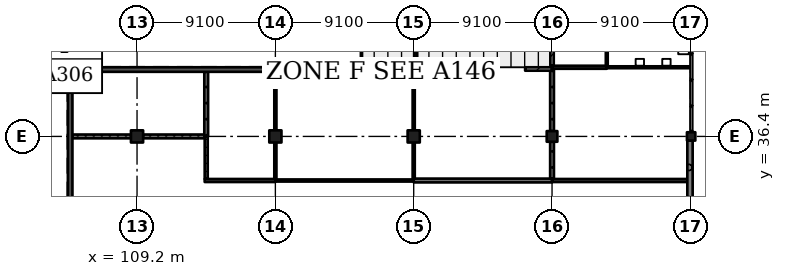
"""IFC4 building model, lengths in metres.
Left out: names, types, materials, properties, quantities, classifications, styles, units other than length and angle.
Written with IfcOpenShell. Run it as: python <this file> out.ifc"""

import sys

from ifc_helpers import new_model, si_unit, direction, frame, frame_2d, origin, origin_2d, place, context, subcontext, project, spatial, rectangle, extrude, element, fill, save


model = new_model("IFC4")
c1 = context("Model", 3, precision=1e-05, world=origin(), true_north=direction((0.0, 1.0)))
c2 = subcontext(c1, "Body", "Model", "MODEL_VIEW")
j1 = project(units=[si_unit("LENGTHUNIT", "METRE"), si_unit("PLANEANGLEUNIT", "RADIAN")], contexts=[c1])
p1 = place(None, origin())
s1 = spatial("IfcSite", under=j1, at=p1, CompositionType="ELEMENT")
p2 = place(p1, origin())
s2 = spatial("IfcBuilding", under=s1, at=p2, CompositionType="ELEMENT")
p3 = place(p2, frame((0.0, 0.0, 15.47)))
s3 = spatial("IfcBuildingStorey", under=s2, at=p3, CompositionType="ELEMENT", Elevation=15.47)
for number, where, z_axis, x_axis in (
    (1, (109.2, 36.4, 0.0), (0.0, 0.0, 1.0), (1.0, 0.0, 0.0)),
    (2, (118.3, 36.4, 0.0), (0.0, 0.0, 1.0), (1.0, 0.0, 0.0)),
    (3, (127.4, 36.4, 0.0), (0.0, 0.0, 1.0), (1.0, 0.0, 0.0)),
):
    element("IfcColumn", number, at=place(p3, frame(where, z_axis=z_axis, x_axis=x_axis)), inside=s3, PredefinedType="COLUMN", context=c2, shape_type="SweptSolid", body=[
        extrude(rectangle(XDim=0.8, YDim=0.8, at=origin_2d()), origin(), (0.0, 0.0, 1.0), 4.55),
    ])
p4 = place(p3, frame((136.5, 36.4, 0.0), z_axis=(0.0, 0.0, 1.0), x_axis=(1.0, 0.0, 0.0)))
e4 = element("IfcColumn", 4, at=p4, inside=s3, PredefinedType="COLUMN", context=c2, shape_type="SweptSolid", body=[
    extrude(rectangle(XDim=0.7, YDim=0.7, at=origin_2d()), origin(), (0.0, 0.0, 1.0), 4.55),
])
p5 = place(p3, frame((145.65, 36.4, 0.0), z_axis=(0.0, 0.0, 1.0), x_axis=(1.0, 0.0, 0.0)))
e5 = element("IfcColumn", 5, at=p5, inside=s3, PredefinedType="COLUMN", context=c2, shape_type="SweptSolid", body=[
    extrude(rectangle(XDim=0.55, YDim=0.55, at=origin_2d()), origin(), (0.0, 0.0, 1.0), 4.55),
])
for number, where, z_axis, x_axis in (
    (6, (104.8, 40.95, 0.0), (0.0, 0.0, 1.0), (0.0, -1.0, 0.0)),
    (7, (104.65, 40.8, 0.0), (0.0, 0.0, 1.0), (1.0, 0.0, 0.0)),
):
    element("IfcWall", number, at=place(p3, frame(where, z_axis=z_axis, x_axis=x_axis)), inside=s3, PredefinedType="SHEAR", context=c2, shape_type="SweptSolid", body=[
        extrude(rectangle(XDim=22.75, YDim=0.3, at=frame_2d((11.375, 0.0))), origin(), (0.0, 0.0, 1.0), 4.55),
    ])
p6 = place(p3, frame((145.575, 27.55, 0.0), z_axis=(0.0, 0.0, 1.0), x_axis=(0.0, 1.0, 0.0)))
e8 = element("IfcWall", 8, at=p6, inside=s3, PredefinedType="SOLIDWALL", context=c2, shape_type="SweptSolid", body=[
    extrude(rectangle(XDim=8.575, YDim=0.35, at=frame_2d((4.288, 0.0))), origin(), (0.0, 0.0, 1.0), 3.55),
])
p7 = place(p3, frame((108.8, 36.4, 0.0), z_axis=(0.0, 0.0, 1.0), x_axis=(-1.0, 0.0, 0.0)))
e9 = element("IfcWall", 9, at=p7, inside=s3, PredefinedType="SOLIDWALL", context=c2, shape_type="SweptSolid", body=[
    extrude(rectangle(XDim=3.85, YDim=0.25, at=frame_2d((1.925, 0.0))), origin(), (0.0, 0.0, 1.0), 4.3),
])
p8 = place(p3, frame((113.625, 36.4, 0.0), z_axis=(0.0, 0.0, 1.0), x_axis=(-1.0, 0.0, 0.0)))
e10 = element("IfcWall", 10, at=p8, inside=s3, PredefinedType="SOLIDWALL", context=c2, shape_type="SweptSolid", body=[
    extrude(rectangle(XDim=4.025, YDim=0.25, at=frame_2d((2.012, 0.0))), origin(), (0.0, 0.0, 1.0), 3.6),
])
p9 = place(p8, frame((1.55, 0.0, 0.0)))
e11 = element("IfcOpeningElement", 11, at=p9, cuts=e10, PredefinedType="OPENING", context=c2, shape_type="SweptSolid", body=[
    extrude(rectangle(XDim=1.0, YDim=2.1, at=frame_2d((0.5, 1.05))), frame((0.0, 0.135, 0.0), z_axis=(0.0, -1.0, 0.0), x_axis=(1.0, 0.0, 0.0)), (0.0, 0.0, 1.0), 0.27),
])
p10 = place(p3, frame((113.75, 33.6, 0.0), z_axis=(0.0, 0.0, 1.0), x_axis=(0.0, 1.0, 0.0)))
e12 = element("IfcWall", 12, at=p10, inside=s3, PredefinedType="PARTITIONING", context=c2, shape_type="SweptSolid", body=[
    extrude(rectangle(XDim=2.8, YDim=0.2, at=frame_2d((1.4, 0.0))), origin(), (0.0, 0.0, 1.0), 3.7),
])
p11 = place(p3, frame((113.75, 36.4, 0.0), z_axis=(0.0, 0.0, 1.0), x_axis=(0.0, 1.0, 0.0)))
e13 = element("IfcWall", 13, at=p11, inside=s3, PredefinedType="SOLIDWALL", context=c2, shape_type="SweptSolid", body=[
    extrude(rectangle(XDim=4.25, YDim=0.25, at=frame_2d((2.125, 0.0))), origin(), (0.0, 0.0, 1.0), 4.3),
])
p12 = place(p3, frame((118.3, 33.5, 0.0), z_axis=(0.0, 0.0, 1.0), x_axis=(-1.0, 0.0, 0.0)))
e14 = element("IfcWall", 14, at=p12, inside=s3, PredefinedType="PARTITIONING", context=c2, shape_type="SweptSolid", body=[
    extrude(rectangle(XDim=4.65, YDim=0.2, at=frame_2d((2.325, 0.0))), origin(), (0.0, 0.0, 1.0), 4.3),
])
p13 = place(p12, frame((1.85, 0.0, 0.0)))
e15 = element("IfcOpeningElement", 15, at=p13, cuts=e14, PredefinedType="OPENING", context=c2, shape_type="SweptSolid", body=[
    extrude(rectangle(XDim=1.0, YDim=2.1, at=frame_2d((0.5, 1.05))), frame((0.0, 0.11, 0.0), z_axis=(0.0, -1.0, 0.0), x_axis=(1.0, 0.0, 0.0)), (0.0, 0.0, 1.0), 0.22),
])
p14 = place(p3, frame((118.3, 33.6, 0.0), z_axis=(0.0, 0.0, 1.0), x_axis=(0.0, 1.0, 0.0)))
e16 = element("IfcWall", 16, at=p14, inside=s3, PredefinedType="SOLIDWALL", context=c2, shape_type="SweptSolid", body=[
    extrude(rectangle(XDim=2.4, YDim=0.14, at=frame_2d((1.2, 0.0))), origin(), (0.0, 0.0, 1.0), 3.6),
])
p15 = place(p3, frame((118.3, 36.8, 0.0), z_axis=(0.0, 0.0, 1.0), x_axis=(0.0, 1.0, 0.0)))
e17 = element("IfcWall", 17, at=p15, inside=s3, PredefinedType="SOLIDWALL", context=c2, shape_type="SweptSolid", body=[
    extrude(rectangle(XDim=3.85, YDim=0.14, at=frame_2d((1.925, 0.0))), origin(), (0.0, 0.0, 1.0), 4.3),
])
p16 = place(p3, frame((127.4, 33.5, 0.0), z_axis=(0.0, 0.0, 1.0), x_axis=(-1.0, 0.0, 0.0)))
e18 = element("IfcWall", 18, at=p16, inside=s3, PredefinedType="SOLIDWALL", context=c2, shape_type="SweptSolid", body=[
    extrude(rectangle(XDim=9.1, YDim=0.14, at=frame_2d((4.55, 0.0))), origin(), (0.0, 0.0, 1.0), 4.3),
])
p17 = place(p16, frame((3.85, 0.0, 0.0)))
e19 = element("IfcOpeningElement", 19, at=p17, cuts=e18, PredefinedType="OPENING", context=c2, shape_type="SweptSolid", body=[
    extrude(rectangle(XDim=1.5, YDim=2.1, at=frame_2d((0.75, 1.05))), frame((0.0, 0.08, 0.0), z_axis=(0.0, -1.0, 0.0), x_axis=(1.0, 0.0, 0.0)), (0.0, 0.0, 1.0), 0.16),
])
p18 = place(p3, frame((127.4, 33.625, 0.0), z_axis=(0.0, 0.0, 1.0), x_axis=(0.0, 1.0, 0.0)))
e20 = element("IfcWall", 20, at=p18, inside=s3, PredefinedType="SOLIDWALL", context=c2, shape_type="SweptSolid", body=[
    extrude(rectangle(XDim=2.375, YDim=0.14, at=frame_2d((1.188, 0.0))), origin(), (0.0, 0.0, 1.0), 3.6),
])
p19 = place(p3, frame((127.4, 36.8, 0.0), z_axis=(0.0, 0.0, 1.0), x_axis=(0.0, 1.0, 0.0)))
e21 = element("IfcWall", 21, at=p19, inside=s3, PredefinedType="SOLIDWALL", context=c2, shape_type="SweptSolid", body=[
    extrude(rectangle(XDim=3.85, YDim=0.14, at=frame_2d((1.925, 0.0))), origin(), (0.0, 0.0, 1.0), 4.3),
])
p20 = place(p3, frame((134.73, 40.836, 0.0), z_axis=(0.0, 0.0, 1.0), x_axis=(1.0, 0.0, 0.0)))
e22 = element("IfcWall", 22, at=p20, inside=s3, PredefinedType="PARTITIONING", context=c2, shape_type="SweptSolid", body=[
    extrude(rectangle(XDim=1.77, YDim=0.225, at=frame_2d((0.885, 0.0))), origin(), (0.0, 0.0, 1.0), 4.3),
])
p21 = place(p3, frame((136.5, 33.5, 0.0), z_axis=(0.0, 0.0, 1.0), x_axis=(-1.0, 0.0, 0.0)))
e23 = element("IfcWall", 23, at=p21, inside=s3, PredefinedType="SOLIDWALL", context=c2, shape_type="SweptSolid", body=[
    extrude(rectangle(XDim=9.1, YDim=0.25, at=frame_2d((4.55, 0.0))), origin(), (0.0, 0.0, 1.0), 4.3),
])
p22 = place(p21, frame((4.05, 0.0, 0.0)))
e24 = element("IfcOpeningElement", 24, at=p22, cuts=e23, PredefinedType="OPENING", context=c2, shape_type="SweptSolid", body=[
    extrude(rectangle(XDim=1.0, YDim=2.1, at=frame_2d((0.5, 1.05))), frame((0.0, 0.135, 0.0), z_axis=(0.0, -1.0, 0.0), x_axis=(1.0, 0.0, 0.0)), (0.0, 0.0, 1.0), 0.27),
])
p23 = place(p3, frame((136.5, 33.5, 0.0), z_axis=(0.0, 0.0, 1.0), x_axis=(1.0, 0.0, 0.0)))
e25 = element("IfcWall", 25, at=p23, inside=s3, PredefinedType="PARTITIONING", context=c2, shape_type="SweptSolid", body=[
    extrude(rectangle(XDim=8.9, YDim=0.2, at=frame_2d((4.45, 0.0))), origin(), (0.0, 0.0, 1.0), 4.3),
])
p24 = place(p23, frame((1.05, 0.0, 0.0)))
e26 = element("IfcOpeningElement", 26, at=p24, cuts=e25, PredefinedType="OPENING", context=c2, shape_type="SweptSolid", body=[
    extrude(rectangle(XDim=2.4, YDim=2.4, at=frame_2d((1.2, 1.2))), frame((0.0, 0.11, 0.0), z_axis=(0.0, -1.0, 0.0), x_axis=(1.0, 0.0, 0.0)), (0.0, 0.0, 1.0), 0.22),
])
p25 = place(p23, frame((5.45, 0.0, 0.0)))
e27 = element("IfcOpeningElement", 27, at=p25, cuts=e25, PredefinedType="OPENING", context=c2, shape_type="SweptSolid", body=[
    extrude(rectangle(XDim=2.4, YDim=2.4, at=frame_2d((1.2, 1.2))), frame((0.0, 0.11, 0.0), z_axis=(0.0, -1.0, 0.0), x_axis=(1.0, 0.0, 0.0)), (0.0, 0.0, 1.0), 0.22),
])
p26 = place(p3, frame((136.5, 36.05, 0.0), z_axis=(0.0, 0.0, 1.0), x_axis=(0.0, -1.0, 0.0)))
e28 = element("IfcWall", 28, at=p26, inside=s3, PredefinedType="SOLIDWALL", context=c2, shape_type="SweptSolid", body=[
    extrude(rectangle(XDim=2.425, YDim=0.25, at=frame_2d((1.212, 0.0))), origin(), (0.0, 0.0, 1.0), 3.55),
])
p27 = place(p3, frame((136.5, 40.837, 0.0), z_axis=(0.0, 0.0, 1.0), x_axis=(0.0, -1.0, 0.0)))
e29 = element("IfcWall", 29, at=p27, inside=s3, PredefinedType="SOLIDWALL", context=c2, shape_type="SweptSolid", body=[
    extrude(rectangle(XDim=4.087, YDim=0.25, at=frame_2d((2.044, 0.0))), origin(), (0.0, 0.0, 1.0), 3.55),
])
p28 = place(p3, frame((136.5, 40.95, 0.0), z_axis=(0.0, 0.0, 1.0), x_axis=(1.0, 0.0, 0.0)))
e30 = element("IfcWall", 30, at=p28, inside=s3, PredefinedType="PARTITIONING", context=c2, shape_type="SweptSolid", body=[
    extrude(rectangle(XDim=3.6, YDim=0.2, at=frame_2d((1.8, 0.0))), origin(), (0.0, 0.0, 1.0), 4.3),
])
p29 = place(p28, frame((0.55, 0.0, 0.0)))
e31 = element("IfcOpeningElement", 31, at=p29, cuts=e30, PredefinedType="OPENING", context=c2, shape_type="SweptSolid", body=[
    extrude(rectangle(XDim=2.4, YDim=2.4, at=frame_2d((1.2, 1.2))), frame((0.0, 0.11, 0.0), z_axis=(0.0, -1.0, 0.0), x_axis=(1.0, 0.0, 0.0)), (0.0, 0.0, 1.0), 0.22),
])
p30 = place(p3, frame((136.5, 41.062, 0.0), z_axis=(0.0, 0.0, 1.0), x_axis=(0.0, 1.0, 0.0)))
e32 = element("IfcWall", 32, at=p30, inside=s3, PredefinedType="PARTITIONING", context=c2, shape_type="SweptSolid", body=[
    extrude(rectangle(XDim=4.113, YDim=0.225, at=frame_2d((2.056, 0.0))), origin(), (0.0, 0.0, 1.0), 3.55),
])
p31 = place(p3, frame((140.1, 40.95, 0.0), z_axis=(0.0, 0.0, 1.0), x_axis=(1.0, 0.0, 0.0)))
e33 = element("IfcWall", 33, at=p31, inside=s3, PredefinedType="PARTITIONING", context=c2, shape_type="SweptSolid", body=[
    extrude(rectangle(XDim=5.47, YDim=0.125, at=frame_2d((2.735, 0.0))), origin(), (0.0, 0.0, 1.0), 4.3),
])
p32 = place(p3, frame((140.1, 45.5, 0.0), z_axis=(0.0, 0.0, 1.0), x_axis=(0.0, -1.0, 0.0)))
e34 = element("IfcWall", 34, at=p32, inside=s3, PredefinedType="PARTITIONING", context=c2, shape_type="SweptSolid", body=[
    extrude(rectangle(XDim=4.45, YDim=0.125, at=frame_2d((2.225, 0.0))), origin(), (0.0, 0.0, 1.0), 4.3),
])
p33 = place(p32, frame((1.75, 0.0, 0.0)))
e35 = element("IfcOpeningElement", 35, at=p33, cuts=e34, PredefinedType="OPENING", context=c2, shape_type="SweptSolid", body=[
    extrude(rectangle(XDim=0.9, YDim=2.1, at=frame_2d((0.45, 1.05))), frame((0.0, 0.073, 0.0), z_axis=(0.0, -1.0, 0.0), x_axis=(1.0, 0.0, 0.0)), (0.0, 0.0, 1.0), 0.145),
])
p34 = place(p3, frame((127.53, 40.95, 0.0), z_axis=(0.0, 0.0, 1.0), x_axis=(0.0, 1.0, 0.0)))
e36 = element("IfcWall", 36, at=p34, inside=s3, PredefinedType="PARTITIONING", context=c2, shape_type="SweptSolid", body=[
    extrude(rectangle(XDim=4.25, YDim=0.2, at=frame_2d((2.125, 0.0))), origin(), (0.0, 0.0, 1.0), 2.91),
])
p35 = place(p34, frame((1.125, 0.0, 1.1)))
e37 = element("IfcOpeningElement", 37, at=p35, cuts=e36, PredefinedType="OPENING", context=c2, shape_type="SweptSolid", body=[
    extrude(rectangle(XDim=2.0, YDim=1.3, at=frame_2d((1.0, 0.65))), frame((0.0, 0.11, 0.0), z_axis=(0.0, -1.0, 0.0), x_axis=(1.0, 0.0, 0.0)), (0.0, 0.0, 1.0), 0.22),
])
p36 = place(p22, origin())
e38 = element("IfcDoor", 38, at=p36, inside=s3, OperationType="SINGLE_SWING_RIGHT", PredefinedType="DOOR", context=c2, shape_type="SweptSolid", body=[
    extrude(rectangle(XDim=1.0, YDim=2.1, at=frame_2d((0.5, 1.05))), frame((0.0, 0.025, 0.0), z_axis=(0.0, -1.0, 0.0), x_axis=(1.0, 0.0, 0.0)), (0.0, 0.0, 1.0), 0.05),
])
fill(e24, e38)
p37 = place(p17, origin())
e39 = element("IfcDoor", 39, at=p37, inside=s3, OperationType="DOUBLE_DOOR_SINGLE_SWING", PredefinedType="DOOR", context=c2, shape_type="SweptSolid", body=[
    extrude(rectangle(XDim=1.5, YDim=2.1, at=frame_2d((0.75, 1.05))), frame((0.0, 0.025, 0.0), z_axis=(0.0, -1.0, 0.0), x_axis=(1.0, 0.0, 0.0)), (0.0, 0.0, 1.0), 0.05),
])
fill(e19, e39)
p38 = place(p13, origin())
e40 = element("IfcDoor", 40, at=p38, inside=s3, OperationType="SINGLE_SWING_RIGHT", PredefinedType="DOOR", context=c2, shape_type="SweptSolid", body=[
    extrude(rectangle(XDim=1.0, YDim=2.1, at=frame_2d((0.5, 1.05))), frame((0.0, 0.025, 0.0), z_axis=(0.0, -1.0, 0.0), x_axis=(1.0, 0.0, 0.0)), (0.0, 0.0, 1.0), 0.05),
])
fill(e15, e40)
p39 = place(p9, origin())
e41 = element("IfcDoor", 41, at=p39, inside=s3, OperationType="SINGLE_SWING_RIGHT", PredefinedType="DOOR", context=c2, shape_type="SweptSolid", body=[
    extrude(rectangle(XDim=1.0, YDim=2.1, at=frame_2d((0.5, 1.05))), frame((0.0, 0.025, 0.0), z_axis=(0.0, -1.0, 0.0), x_axis=(1.0, 0.0, 0.0)), (0.0, 0.0, 1.0), 0.05),
])
fill(e11, e41)
p40 = place(p24, origin())
e42 = element("IfcDoor", 42, at=p40, inside=s3, OperationType="DOUBLE_DOOR_SINGLE_SWING", PredefinedType="DOOR", context=c2, shape_type="SweptSolid", body=[
    extrude(rectangle(XDim=2.4, YDim=2.4, at=frame_2d((1.2, 1.2))), frame((0.0, 0.025, 0.0), z_axis=(0.0, -1.0, 0.0), x_axis=(1.0, 0.0, 0.0)), (0.0, 0.0, 1.0), 0.05),
])
fill(e26, e42)
p41 = place(p25, origin())
e43 = element("IfcDoor", 43, at=p41, inside=s3, OperationType="DOUBLE_DOOR_SINGLE_SWING", PredefinedType="DOOR", context=c2, shape_type="SweptSolid", body=[
    extrude(rectangle(XDim=2.4, YDim=2.4, at=frame_2d((1.2, 1.2))), frame((0.0, 0.025, 0.0), z_axis=(0.0, -1.0, 0.0), x_axis=(1.0, 0.0, 0.0)), (0.0, 0.0, 1.0), 0.05),
])
fill(e27, e43)
p42 = place(p29, origin())
e44 = element("IfcDoor", 44, at=p42, inside=s3, OperationType="DOUBLE_DOOR_SINGLE_SWING", PredefinedType="DOOR", context=c2, shape_type="SweptSolid", body=[
    extrude(rectangle(XDim=2.4, YDim=2.4, at=frame_2d((1.2, 1.2))), frame((0.0, 0.025, 0.0), z_axis=(0.0, -1.0, 0.0), x_axis=(1.0, 0.0, 0.0)), (0.0, 0.0, 1.0), 0.05),
])
fill(e31, e44)
save(model, sys.argv[1])
